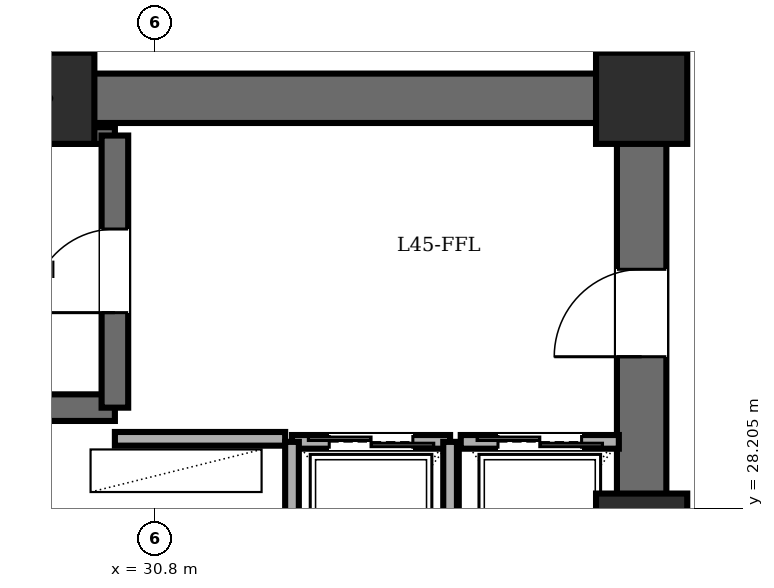
"""IFC4 building model, lengths in metres.
Left out: names, types, materials, properties, quantities, classifications, styles, units other than length and angle.
Written with IfcOpenShell. Run it as: python <this file> out.ifc"""

import sys

from ifc_helpers import new_model, si_unit, direction, frame, frame_2d, origin, origin_2d, place, context, subcontext, project, spatial, rectangle, extrude, element, fill, save


model = new_model("IFC4")
c1 = context("Model", 3, precision=1e-05, world=origin(), true_north=direction((0.0, 1.0)))
c2 = subcontext(c1, "Body", "Model", "MODEL_VIEW")
j1 = project(units=[si_unit("LENGTHUNIT", "METRE"), si_unit("PLANEANGLEUNIT", "RADIAN")], contexts=[c1])
p1 = place(None, origin())
s1 = spatial("IfcSite", under=j1, at=p1, CompositionType="ELEMENT")
p2 = place(p1, origin())
s2 = spatial("IfcBuilding", under=s1, at=p2, CompositionType="ELEMENT")
p3 = place(p2, frame((0.0, 0.0, 172.6)))
s3 = spatial("IfcBuildingStorey", under=s2, at=p3, CompositionType="ELEMENT", Elevation=172.6)
for number, where, z_axis, x_axis in (
    (1, (37.2, 27.8, 0.0), (0.0, 0.0, 1.0), (1.0, 0.0, 0.0)),
    (2, (37.2, 33.6, 0.0), (0.0, 0.0, 1.0), (1.0, 0.0, 0.0)),
    (3, (29.4, 33.6, 0.0), (0.0, 0.0, 1.0), (1.0, 0.0, 0.0)),
):
    element("IfcColumn", number, at=place(p3, frame(where, z_axis=z_axis, x_axis=x_axis)), inside=s3, PredefinedType="COLUMN", context=c2, shape_type="SweptSolid", body=[
        extrude(rectangle(XDim=1.2, YDim=1.2, at=origin_2d()), origin(), (0.0, 0.0, 1.0), 3.6),
    ])
p4 = place(p3, frame((21.6, 33.6, 0.0), z_axis=(0.0, 0.0, 1.0), x_axis=(1.0, 0.0, 0.0)))
e4 = element("IfcWall", 4, at=p4, inside=s3, PredefinedType="SHEAR", context=c2, shape_type="SweptSolid", body=[
    extrude(rectangle(XDim=15.6, YDim=0.65, at=frame_2d((7.8, 0.0))), origin(), (0.0, 0.0, 1.0), 3.4),
])
p5 = place(p3, frame((37.2, 14.4, 0.0), z_axis=(0.0, 0.0, 1.0), x_axis=(0.0, 1.0, 0.0)))
e5 = element("IfcWall", 5, at=p5, inside=s3, PredefinedType="SHEAR", context=c2, shape_type="SweptSolid", body=[
    extrude(rectangle(XDim=19.2, YDim=0.65, at=frame_2d((9.6, 0.0))), origin(), (0.0, 0.0, 1.0), 3.4),
])
p6 = place(p5, frame((15.8, 0.0, 0.0)))
e6 = element("IfcOpeningElement", 6, at=p6, cuts=e5, PredefinedType="OPENING", context=c2, shape_type="SweptSolid", body=[
    extrude(rectangle(XDim=1.15, YDim=2.15, at=frame_2d((0.575, 1.075))), frame((0.0, 0.335, 0.0), z_axis=(0.0, -1.0, 0.0), x_axis=(1.0, 0.0, 0.0)), (0.0, 0.0, 1.0), 0.67),
])
p7 = place(p5, frame((3.6, 0.0, 0.0)))
e7 = element("IfcOpeningElement", 7, at=p7, cuts=e5, PredefinedType="OPENING", context=c2, shape_type="SweptSolid", body=[
    extrude(rectangle(XDim=1.1, YDim=2.15, at=frame_2d((0.55, 1.075))), frame((0.0, 0.335, 0.0), z_axis=(0.0, -1.0, 0.0), x_axis=(1.0, 0.0, 0.0)), (0.0, 0.0, 1.0), 0.67),
])
p8 = place(p5, frame((8.6, 0.0, 0.0)))
e8 = element("IfcOpeningElement", 8, at=p8, cuts=e5, PredefinedType="OPENING", context=c2, shape_type="SweptSolid", body=[
    extrude(rectangle(XDim=1.3, YDim=2.2, at=frame_2d((0.65, 1.1))), frame((0.0, 0.335, 0.0), z_axis=(0.0, -1.0, 0.0), x_axis=(1.0, 0.0, 0.0)), (0.0, 0.0, 1.0), 0.67),
])
p9 = place(p3, frame((22.48, 29.53, 0.0), z_axis=(0.0, 0.0, 1.0), x_axis=(1.0, 0.0, 0.0)))
e9 = element("IfcWall", 9, at=p9, inside=s3, PredefinedType="SOLIDWALL", context=c2, shape_type="SweptSolid", body=[
    extrude(rectangle(XDim=7.79, YDim=0.35, at=frame_2d((3.895, 0.0))), origin(), (0.0, 0.0, 1.0), 3.4),
])
p10 = place(p3, frame((22.48, 33.11, 0.0), z_axis=(0.0, 0.0, 1.0), x_axis=(1.0, 0.0, 0.0)))
e10 = element("IfcWall", 10, at=p10, inside=s3, PredefinedType="PARTITIONING", context=c2, shape_type="SweptSolid", body=[
    extrude(rectangle(XDim=7.79, YDim=0.22, at=frame_2d((3.895, 0.0))), origin(), (0.0, 0.0, 1.0), 3.4),
])
p11 = place(p3, frame((30.27, 29.53, 0.0), z_axis=(0.0, 0.0, 1.0), x_axis=(0.0, 1.0, 0.0)))
e11 = element("IfcWall", 11, at=p11, inside=s3, PredefinedType="SOLIDWALL", context=c2, shape_type="SweptSolid", body=[
    extrude(rectangle(XDim=3.58, YDim=0.35, at=frame_2d((1.79, 0.0))), origin(), (0.0, 0.0, 1.0), 3.4),
])
p12 = place(p11, frame((1.25, 0.0, 0.0)))
e12 = element("IfcOpeningElement", 12, at=p12, cuts=e11, PredefinedType="OPENING", context=c2, shape_type="SweptSolid", body=[
    extrude(rectangle(XDim=1.1, YDim=2.15, at=frame_2d((0.55, 1.075))), frame((0.0, 0.185, 0.0), z_axis=(0.0, -1.0, 0.0), x_axis=(1.0, 0.0, 0.0)), (0.0, 0.0, 1.0), 0.37),
])
p13 = place(p3, frame((30.27, 29.12, 0.0), z_axis=(0.0, 0.0, 1.0), x_axis=(1.0, 0.0, 0.0)))
e13 = element("IfcWall", 13, at=p13, inside=s3, PredefinedType="PARTITIONING", context=c2, shape_type="SweptSolid", body=[
    extrude(rectangle(XDim=2.24, YDim=0.18, at=frame_2d((1.12, 0.0))), origin(), (0.0, 0.0, 1.0), 3.4),
])
p14 = place(p3, frame((32.6, 29.08, 0.0), z_axis=(0.0, 0.0, 1.0), x_axis=(1.0, 0.0, 0.0)))
e14 = element("IfcWall", 14, at=p14, inside=s3, PredefinedType="PARTITIONING", context=c2, shape_type="SweptSolid", body=[
    extrude(rectangle(XDim=2.08, YDim=0.18, at=frame_2d((1.04, 0.0))), origin(), (0.0, 0.0, 1.0), 3.4),
])
p15 = place(p14, frame((0.49, 0.0, 0.0)))
e15 = element("IfcOpeningElement", 15, at=p15, cuts=e14, PredefinedType="OPENING", context=c2, shape_type="SweptSolid", body=[
    extrude(rectangle(XDim=1.1, YDim=2.2, at=frame_2d((0.55, 1.1))), frame((0.0, 0.1, 0.0), z_axis=(0.0, -1.0, 0.0), x_axis=(1.0, 0.0, 0.0)), (0.0, 0.0, 1.0), 0.2),
])
for number, where, z_axis, x_axis in (
    (16, (34.68, 26.35, 0.0), (0.0, 0.0, 1.0), (0.0, 1.0, 0.0)),
    (17, (32.6, 29.08, 0.0), (0.0, 0.0, 1.0), (0.0, -1.0, 0.0)),
):
    element("IfcWall", number, at=place(p3, frame(where, z_axis=z_axis, x_axis=x_axis)), inside=s3, PredefinedType="PARTITIONING", context=c2, shape_type="SweptSolid", body=[
        extrude(rectangle(XDim=2.73, YDim=0.18, at=frame_2d((1.365, 0.0))), origin(), (0.0, 0.0, 1.0), 3.4),
    ])
p16 = place(p3, frame((34.82, 29.08, 0.0), z_axis=(0.0, 0.0, 1.0), x_axis=(1.0, 0.0, 0.0)))
e18 = element("IfcWall", 18, at=p16, inside=s3, PredefinedType="PARTITIONING", context=c2, shape_type="SweptSolid", body=[
    extrude(rectangle(XDim=2.08, YDim=0.18, at=frame_2d((1.04, 0.0))), origin(), (0.0, 0.0, 1.0), 3.4),
])
p17 = place(p16, frame((0.49, 0.0, 0.0)))
e19 = element("IfcOpeningElement", 19, at=p17, cuts=e18, PredefinedType="OPENING", context=c2, shape_type="SweptSolid", body=[
    extrude(rectangle(XDim=1.1, YDim=2.2, at=frame_2d((0.55, 1.1))), frame((0.0, 0.1, 0.0), z_axis=(0.0, -1.0, 0.0), x_axis=(1.0, 0.0, 0.0)), (0.0, 0.0, 1.0), 0.2),
])
p18 = place(p12, origin())
e20 = element("IfcDoor", 20, at=p18, inside=s3, OperationType="SINGLE_SWING_LEFT", PredefinedType="DOOR", context=c2, shape_type="SweptSolid", body=[
    extrude(rectangle(XDim=1.1, YDim=2.15, at=frame_2d((0.55, 1.075))), frame((0.0, 0.025, 0.0), z_axis=(0.0, -1.0, 0.0), x_axis=(1.0, 0.0, 0.0)), (0.0, 0.0, 1.0), 0.05),
])
fill(e12, e20)
p19 = place(p6, origin())
e21 = element("IfcDoor", 21, at=p19, inside=s3, OperationType="SINGLE_SWING_LEFT", PredefinedType="DOOR", context=c2, shape_type="SweptSolid", body=[
    extrude(rectangle(XDim=1.15, YDim=2.15, at=frame_2d((0.575, 1.075))), frame((0.0, 0.025, 0.0), z_axis=(0.0, -1.0, 0.0), x_axis=(1.0, 0.0, 0.0)), (0.0, 0.0, 1.0), 0.05),
])
fill(e6, e21)
p20 = place(p15, origin())
e22 = element("IfcDoor", 22, at=p20, inside=s3, OperationType="DOUBLE_DOOR_SLIDING", PredefinedType="DOOR", context=c2, shape_type="SweptSolid", body=[
    extrude(rectangle(XDim=1.1, YDim=2.2, at=frame_2d((0.55, 1.1))), frame((0.0, 0.025, 0.0), z_axis=(0.0, -1.0, 0.0), x_axis=(1.0, 0.0, 0.0)), (0.0, 0.0, 1.0), 0.05),
])
fill(e15, e22)
p21 = place(p17, origin())
e23 = element("IfcDoor", 23, at=p21, inside=s3, OperationType="DOUBLE_DOOR_SLIDING", PredefinedType="DOOR", context=c2, shape_type="SweptSolid", body=[
    extrude(rectangle(XDim=1.1, YDim=2.2, at=frame_2d((0.55, 1.1))), frame((0.0, 0.025, 0.0), z_axis=(0.0, -1.0, 0.0), x_axis=(1.0, 0.0, 0.0)), (0.0, 0.0, 1.0), 0.05),
])
fill(e19, e23)
save(model, sys.argv[1])
